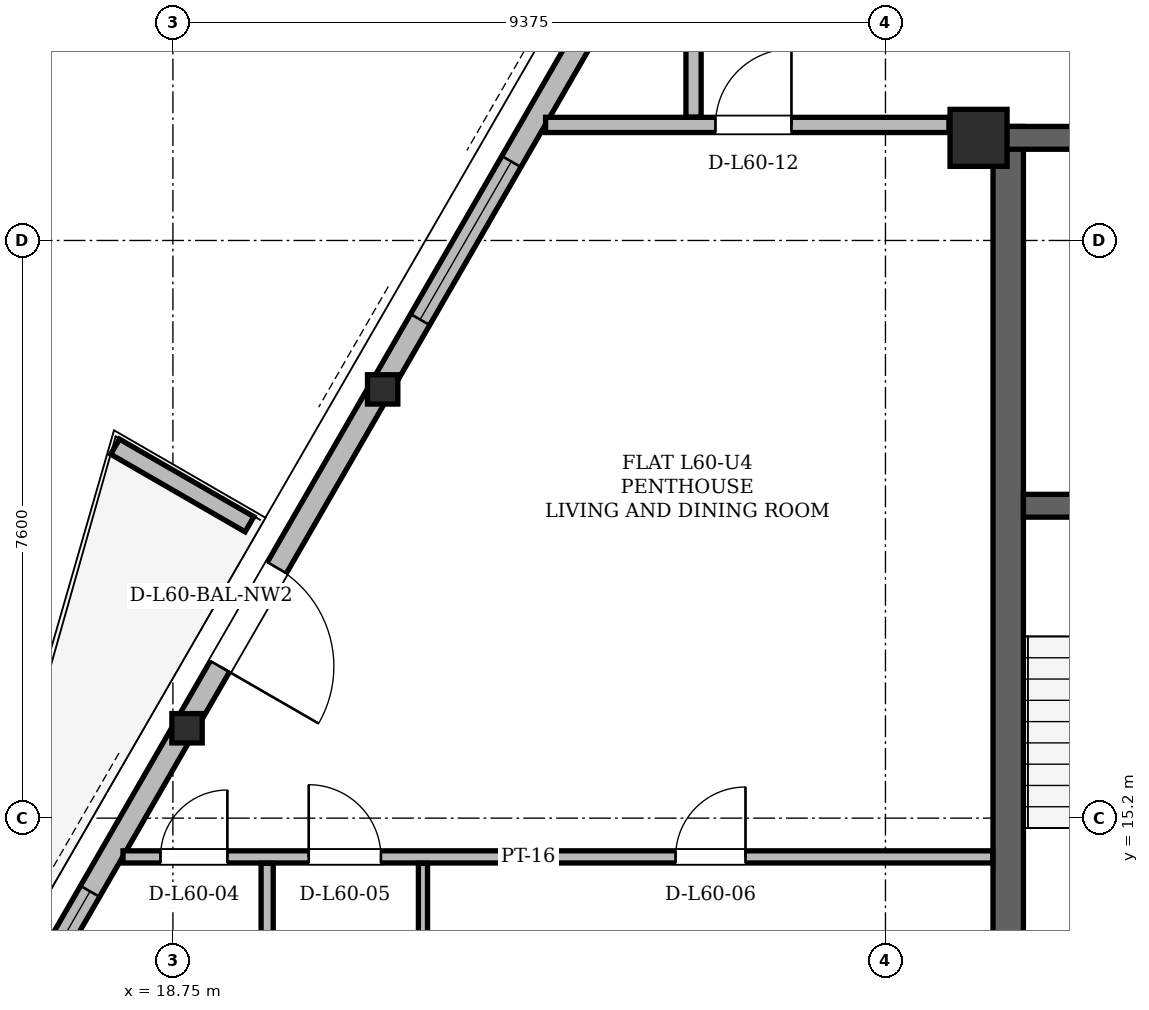
"""IFC4 building model, lengths in metres.
Left out: names, types, materials, properties, quantities, classifications, styles, units other than length and angle.
Written with IfcOpenShell. Run it as: python <this file> out.ifc"""

import sys

from ifc_helpers import new_model, si_unit, direction, frame, frame_2d, origin, origin_2d, place, context, subcontext, project, spatial, polyline, rectangle, hollow_rectangle, i_section, outline, extrude, element, fill, save


model = new_model("IFC4")
c1 = context("Model", 3, precision=1e-05, world=origin(), true_north=direction((0.0, 1.0)))
c2 = subcontext(c1, "Body", "Model", "MODEL_VIEW")
j1 = project(units=[si_unit("LENGTHUNIT", "METRE"), si_unit("PLANEANGLEUNIT", "RADIAN")], contexts=[c1])
p1 = place(None, origin())
s1 = spatial("IfcSite", under=j1, at=p1, CompositionType="ELEMENT")
p2 = place(p1, origin())
s2 = spatial("IfcBuilding", under=s1, at=p2, CompositionType="ELEMENT")
p3 = place(p2, frame((0.0, 0.0, 227.1)))
s3 = spatial("IfcBuildingStorey", under=s2, at=p3, CompositionType="ELEMENT", Elevation=227.1)
p4 = place(p3, frame((29.35, 24.15, 0.0), z_axis=(0.0, 0.0, 1.0), x_axis=(1.0, 0.0, 0.0)))
e1 = element("IfcColumn", 1, at=p4, inside=s3, PredefinedType="COLUMN", context=c2, shape_type="SweptSolid", body=[
    extrude(hollow_rectangle(XDim=0.75, YDim=0.75, WallThickness=0.06, at=origin_2d()), origin(), (0.0, 0.0, 1.0), 3.6),
])
p5 = place(p3, frame((21.484, 20.862, 0.004), z_axis=(0.014138633229, -0.011623587895, 0.999832481596), x_axis=(0.635056158455, 0.772465970518, 0.0)))
e2 = element("IfcColumn", 2, at=p5, inside=s3, PredefinedType="COLUMN", context=c2, shape_type="SweptSolid", body=[
    extrude(i_section(OverallWidth=0.399, OverallDepth=0.386, WebThickness=0.021, FlangeThickness=0.033, at=origin_2d()), origin(), (0.0, 0.0, 1.0), 3.592),
])
p6 = place(p3, frame((18.912, 16.407, 0.004), z_axis=(0.013118912573, -0.013390807134, 0.999824274769), x_axis=(0.714321588262, 0.699817596622, 0.0)))
e3 = element("IfcColumn", 3, at=p6, inside=s3, PredefinedType="COLUMN", context=c2, shape_type="SweptSolid", body=[
    extrude(i_section(OverallWidth=0.399, OverallDepth=0.386, WebThickness=0.021, FlangeThickness=0.033, at=origin_2d()), origin(), (0.0, 0.0, 1.0), 3.592),
])
p7 = place(p3, frame((29.74, 11.0, 0.0), z_axis=(0.0, 0.0, 1.0), x_axis=(0.0, 1.0, 0.0)))
e4 = element("IfcWall", 4, at=p7, inside=s3, PredefinedType="SHEAR", context=c2, shape_type="SweptSolid", body=[
    extrude(rectangle(XDim=13.3, YDim=0.4, at=frame_2d((6.65, 0.0))), origin(), (0.0, 0.0, 1.0), 3.38),
])
p8 = place(p3, frame((29.65, 24.15, 0.0), z_axis=(0.0, 0.0, 1.0), x_axis=(1.0, 0.0, 0.0)))
e5 = element("IfcWall", 5, at=p8, inside=s3, PredefinedType="SHEAR", context=c2, shape_type="SweptSolid", body=[
    extrude(rectangle(XDim=15.7, YDim=0.3, at=frame_2d((7.85, 0.0))), origin(), (0.0, 0.0, 1.0), 3.38),
])
p9 = place(p8, frame((1.7, 0.0, 0.0)))
e6 = element("IfcOpeningElement", 6, at=p9, cuts=e5, PredefinedType="OPENING", context=c2, shape_type="SweptSolid", body=[
    extrude(rectangle(XDim=1.2, YDim=2.2, at=frame_2d((0.6, 1.1))), frame((0.0, 0.15, 0.0), z_axis=(0.0, -1.0, 0.0), x_axis=(1.0, 0.0, 0.0)), (0.0, 0.0, 1.0), 0.3),
])
p10 = place(p8, frame((12.8, 0.0, 0.0)))
e7 = element("IfcOpeningElement", 7, at=p10, cuts=e5, PredefinedType="OPENING", context=c2, shape_type="SweptSolid", body=[
    extrude(rectangle(XDim=1.2, YDim=2.2, at=frame_2d((0.6, 1.1))), frame((0.0, 0.15, 0.0), z_axis=(0.0, -1.0, 0.0), x_axis=(1.0, 0.0, 0.0)), (0.0, 0.0, 1.0), 0.3),
])
p11 = place(p8, frame((6.55, 0.0, 0.0)))
e8 = element("IfcOpeningElement", 8, at=p11, cuts=e5, PredefinedType="OPENING", context=c2, shape_type="SweptSolid", body=[
    extrude(rectangle(XDim=0.9, YDim=2.05, at=frame_2d((0.45, 1.025))), frame((0.0, 0.15, 0.0), z_axis=(0.0, -1.0, 0.0), x_axis=(1.0, 0.0, 0.0)), (0.0, 0.0, 1.0), 0.3),
])
p12 = place(p8, frame((8.45, 0.0, 0.0)))
e9 = element("IfcOpeningElement", 9, at=p12, cuts=e5, PredefinedType="OPENING", context=c2, shape_type="SweptSolid", body=[
    extrude(rectangle(XDim=0.9, YDim=2.05, at=frame_2d((0.45, 1.025))), frame((0.0, 0.15, 0.0), z_axis=(0.0, -1.0, 0.0), x_axis=(1.0, 0.0, 0.0)), (0.0, 0.0, 1.0), 0.3),
])
p13 = place(p3, frame((29.94, 19.31, 0.0), z_axis=(0.0, 0.0, 1.0), x_axis=(1.0, 0.0, 0.0)))
e10 = element("IfcWall", 10, at=p13, inside=s3, PredefinedType="SHEAR", context=c2, shape_type="SweptSolid", body=[
    extrude(rectangle(XDim=4.01, YDim=0.3, at=frame_2d((2.005, 0.0))), origin(), (0.0, 0.0, 1.0), 3.38),
])
p14 = place(p13, frame((1.01, 0.0, 0.0)))
e11 = element("IfcOpeningElement", 11, at=p14, cuts=e10, PredefinedType="OPENING", context=c2, shape_type="SweptSolid", body=[
    extrude(rectangle(XDim=1.4, YDim=2.2, at=frame_2d((0.7, 1.1))), frame((0.0, 0.15, 0.0), z_axis=(0.0, -1.0, 0.0), x_axis=(1.0, 0.0, 0.0)), (0.0, 0.0, 1.0), 0.3),
])
p15 = place(p3, frame((34.344, 43.135, 0.0), z_axis=(0.0, 0.0, 1.0), x_axis=(-0.499998927115, -0.866026023214, 0.0)))
e12 = element("IfcWall", 12, at=p15, inside=s3, PredefinedType="SOLIDWALL", context=c2, shape_type="SweptSolid", body=[
    extrude(rectangle(XDim=36.742, YDim=0.29, at=frame_2d((18.371, 0.0))), origin(), (0.0, 0.0, 1.0), 2.677),
])
p16 = place(p15, frame((8.664, 0.0, 0.0)))
e13 = element("IfcOpeningElement", 13, at=p16, cuts=e12, PredefinedType="OPENING", context=c2, shape_type="SweptSolid", body=[
    extrude(rectangle(XDim=1.5, YDim=2.2, at=frame_2d((0.75, 1.1))), frame((0.0, 0.145, 0.0), z_axis=(0.0, -1.0, 0.0), x_axis=(1.0, 0.0, 0.0)), (0.0, 0.0, 1.0), 0.29),
])
p17 = place(p15, frame((28.452, 0.0, 0.0)))
e14 = element("IfcOpeningElement", 14, at=p17, cuts=e12, PredefinedType="OPENING", context=c2, shape_type="SweptSolid", body=[
    extrude(rectangle(XDim=1.5, YDim=2.2, at=frame_2d((0.75, 1.1))), frame((0.0, 0.145, 0.0), z_axis=(0.0, -1.0, 0.0), x_axis=(1.0, 0.0, 0.0)), (0.0, 0.0, 1.0), 0.29),
])
p18 = place(p15, frame((22.282, 0.0, 0.85)))
e15 = element("IfcOpeningElement", 15, at=p18, cuts=e12, PredefinedType="OPENING", context=c2, shape_type="SweptSolid", body=[
    extrude(rectangle(XDim=2.4, YDim=1.717, at=frame_2d((1.2, 0.858))), frame((0.0, 0.145, 0.0), z_axis=(0.0, -1.0, 0.0), x_axis=(1.0, 0.0, 0.0)), (0.0, 0.0, 1.0), 0.29),
])
p19 = place(p15, frame((33.369, 0.0, 0.85)))
e16 = element("IfcOpeningElement", 16, at=p19, cuts=e12, PredefinedType="OPENING", context=c2, shape_type="SweptSolid", body=[
    extrude(rectangle(XDim=2.2, YDim=1.717, at=frame_2d((1.1, 0.858))), frame((0.0, 0.145, 0.0), z_axis=(0.0, -1.0, 0.0), x_axis=(1.0, 0.0, 0.0)), (0.0, 0.0, 1.0), 0.29),
])
p20 = place(p15, frame((11.999, 0.0, 0.85)))
e17 = element("IfcOpeningElement", 17, at=p20, cuts=e12, PredefinedType="OPENING", context=c2, shape_type="SweptSolid", body=[
    extrude(rectangle(XDim=2.4, YDim=1.717, at=frame_2d((1.2, 0.858))), frame((0.0, 0.145, 0.0), z_axis=(0.0, -1.0, 0.0), x_axis=(1.0, 0.0, 0.0)), (0.0, 0.0, 1.0), 0.29),
])
p21 = place(p15, frame((16.783, 0.0, 0.85)))
e18 = element("IfcOpeningElement", 18, at=p21, cuts=e12, PredefinedType="OPENING", context=c2, shape_type="SweptSolid", body=[
    extrude(rectangle(XDim=1.8, YDim=1.717, at=frame_2d((0.9, 0.858))), frame((0.0, 0.145, 0.0), z_axis=(0.0, -1.0, 0.0), x_axis=(1.0, 0.0, 0.0)), (0.0, 0.0, 1.0), 0.29),
])
p22 = place(p15, frame((3.365, 0.0, 0.85)))
e19 = element("IfcOpeningElement", 19, at=p22, cuts=e12, PredefinedType="OPENING", context=c2, shape_type="SweptSolid", body=[
    extrude(rectangle(XDim=1.2, YDim=1.48, at=frame_2d((0.6, 0.74))), frame((0.0, 0.145, 0.0), z_axis=(0.0, -1.0, 0.0), x_axis=(1.0, 0.0, 0.0)), (0.0, 0.0, 1.0), 0.29),
])
p23 = place(p15, frame((6.797, 0.0, 0.85)))
e20 = element("IfcOpeningElement", 20, at=p23, cuts=e12, PredefinedType="OPENING", context=c2, shape_type="SweptSolid", body=[
    extrude(rectangle(XDim=1.2, YDim=1.48, at=frame_2d((0.6, 0.74))), frame((0.0, 0.145, 0.0), z_axis=(0.0, -1.0, 0.0), x_axis=(1.0, 0.0, 0.0)), (0.0, 0.0, 1.0), 0.29),
])
p24 = place(p3, frame((19.757, 19.066, 0.0), z_axis=(0.0, 0.0, 1.0), x_axis=(-0.866012356593, 0.500022597718, 0.0)))
e21 = element("IfcWall", 21, at=p24, inside=s3, PredefinedType="PARAPET", context=c2, shape_type="SweptSolid", body=[
    extrude(outline(polyline([(0.0, 0.0), (2.042, 0.0), (2.042, 1.1), (0.0, 1.32), (0.0, 0.0)])), frame((0.0, 0.115, 0.0), z_axis=(0.0, -1.0, 0.0), x_axis=(1.0, 0.0, 0.0)), (0.0, 0.0, 1.0), 0.23),
])
p25 = place(p3, frame((18.094, 14.69, 0.0), z_axis=(0.0, 0.0, 1.0), x_axis=(1.0, 0.0, 0.0)))
e22 = element("IfcWall", 22, at=p25, inside=s3, PredefinedType="PARTITIONING", context=c2, shape_type="SweptSolid", body=[
    extrude(rectangle(XDim=11.442, YDim=0.16, at=frame_2d((5.721, 0.0))), origin(), (0.0, 0.0, 1.0), 2.52),
])
p26 = place(p25, frame((0.493, 0.0, 0.0)))
e23 = element("IfcOpeningElement", 23, at=p26, cuts=e22, PredefinedType="OPENING", context=c2, shape_type="SweptSolid", body=[
    extrude(rectangle(XDim=0.88, YDim=2.08, at=frame_2d((0.44, 1.04))), frame((0.0, 0.08, 0.0), z_axis=(0.0, -1.0, 0.0), x_axis=(1.0, 0.0, 0.0)), (0.0, 0.0, 1.0), 0.16),
])
p27 = place(p25, frame((2.443, 0.0, 0.0)))
e24 = element("IfcOpeningElement", 24, at=p27, cuts=e22, PredefinedType="OPENING", context=c2, shape_type="SweptSolid", body=[
    extrude(rectangle(XDim=0.95, YDim=2.1, at=frame_2d((0.475, 1.05))), frame((0.0, 0.08, 0.0), z_axis=(0.0, -1.0, 0.0), x_axis=(1.0, 0.0, 0.0)), (0.0, 0.0, 1.0), 0.16),
])
p28 = place(p25, frame((7.27, 0.0, 0.0)))
e25 = element("IfcOpeningElement", 25, at=p28, cuts=e22, PredefinedType="OPENING", context=c2, shape_type="SweptSolid", body=[
    extrude(rectangle(XDim=0.92, YDim=2.12, at=frame_2d((0.46, 1.06))), frame((0.0, 0.08, 0.0), z_axis=(0.0, -1.0, 0.0), x_axis=(1.0, 0.0, 0.0)), (0.0, 0.0, 1.0), 0.16),
])
p29 = place(p3, frame((23.653, 24.32, 0.0), z_axis=(0.0, 0.0, 1.0), x_axis=(1.0, 0.0, 0.0)))
e26 = element("IfcWall", 26, at=p29, inside=s3, PredefinedType="PARTITIONING", context=c2, shape_type="SweptSolid", body=[
    extrude(rectangle(XDim=5.307, YDim=0.2, at=frame_2d((2.653, 0.0))), origin(), (0.0, 0.0, 1.0), 3.38),
])
p30 = place(p29, frame((2.235, 0.0, 0.0)))
e27 = element("IfcOpeningElement", 27, at=p30, cuts=e26, PredefinedType="OPENING", context=c2, shape_type="SweptSolid", body=[
    extrude(rectangle(XDim=1.0, YDim=2.18, at=frame_2d((0.5, 1.09))), frame((0.0, 0.1, 0.0), z_axis=(0.0, -1.0, 0.0), x_axis=(1.0, 0.0, 0.0)), (0.0, 0.0, 1.0), 0.2),
])
p31 = place(p3, frame((19.99, 11.054, 0.0), z_axis=(0.0, 0.0, 1.0), x_axis=(0.0, 1.0, 0.0)))
e28 = element("IfcWall", 28, at=p31, inside=s3, PredefinedType="PARTITIONING", context=c2, shape_type="SweptSolid", body=[
    extrude(rectangle(XDim=3.552, YDim=0.16, at=frame_2d((1.776, 0.0))), origin(), (0.0, 0.0, 1.0), 2.913),
])
p32 = place(p3, frame((22.04, 11.054, 0.0), z_axis=(0.0, 0.0, 1.0), x_axis=(0.0, 1.0, 0.0)))
e29 = element("IfcWall", 29, at=p32, inside=s3, PredefinedType="PARTITIONING", context=c2, shape_type="SweptSolid", body=[
    extrude(rectangle(XDim=3.552, YDim=0.12, at=frame_2d((1.776, 0.0))), origin(), (0.0, 0.0, 1.0), 3.38),
])
p33 = place(p3, frame((25.6, 24.424, 0.0), z_axis=(0.0, 0.0, 1.0), x_axis=(0.0, 1.0, 0.0)))
e30 = element("IfcWall", 30, at=p33, inside=s3, PredefinedType="PARTITIONING", context=c2, shape_type="SweptSolid", body=[
    extrude(rectangle(XDim=1.442, YDim=0.2, at=frame_2d((0.721, 0.0))), origin(), (0.0, 0.0, 1.0), 3.38),
])
p34 = place(p17, origin())
e31 = element("IfcDoor", 31, at=p34, inside=s3, OperationType="SINGLE_SWING_RIGHT", PredefinedType="DOOR", context=c2, shape_type="SweptSolid", body=[
    extrude(rectangle(XDim=1.5, YDim=2.2, at=frame_2d((0.75, 1.1))), frame((0.0, 0.025, 0.0), z_axis=(0.0, -1.0, 0.0), x_axis=(1.0, 0.0, 0.0)), (0.0, 0.0, 1.0), 0.05),
])
fill(e14, e31)
p35 = place(p18, origin())
e32 = element("IfcWindow", 32, at=p35, inside=s3, PartitioningType="SINGLE_PANEL", PredefinedType="WINDOW", context=c2, shape_type="SweptSolid", body=[
    extrude(rectangle(XDim=2.4, YDim=1.717, at=frame_2d((1.2, 0.858))), frame((0.0, 0.03, 0.0), z_axis=(0.0, -1.0, 0.0), x_axis=(1.0, 0.0, 0.0)), (0.0, 0.0, 1.0), 0.06),
])
fill(e15, e32)
p36 = place(p19, origin())
e33 = element("IfcWindow", 33, at=p36, inside=s3, PartitioningType="SINGLE_PANEL", PredefinedType="WINDOW", context=c2, shape_type="SweptSolid", body=[
    extrude(rectangle(XDim=2.2, YDim=1.717, at=frame_2d((1.1, 0.858))), frame((0.0, 0.03, 0.0), z_axis=(0.0, -1.0, 0.0), x_axis=(1.0, 0.0, 0.0)), (0.0, 0.0, 1.0), 0.06),
])
fill(e16, e33)
p37 = place(p26, origin())
e34 = element("IfcDoor", 34, at=p37, inside=s3, OperationType="SINGLE_SWING_RIGHT", PredefinedType="DOOR", context=c2, shape_type="SweptSolid", body=[
    extrude(rectangle(XDim=0.88, YDim=2.08, at=frame_2d((0.44, 1.04))), frame((0.0, 0.025, 0.0), z_axis=(0.0, -1.0, 0.0), x_axis=(1.0, 0.0, 0.0)), (0.0, 0.0, 1.0), 0.05),
])
fill(e23, e34)
p38 = place(p27, origin())
e35 = element("IfcDoor", 35, at=p38, inside=s3, OperationType="SINGLE_SWING_LEFT", PredefinedType="DOOR", context=c2, shape_type="SweptSolid", body=[
    extrude(rectangle(XDim=0.95, YDim=2.1, at=frame_2d((0.475, 1.05))), frame((0.0, 0.025, 0.0), z_axis=(0.0, -1.0, 0.0), x_axis=(1.0, 0.0, 0.0)), (0.0, 0.0, 1.0), 0.05),
])
fill(e24, e35)
p39 = place(p28, origin())
e36 = element("IfcDoor", 36, at=p39, inside=s3, OperationType="SINGLE_SWING_RIGHT", PredefinedType="DOOR", context=c2, shape_type="SweptSolid", body=[
    extrude(rectangle(XDim=0.92, YDim=2.12, at=frame_2d((0.46, 1.06))), frame((0.0, 0.025, 0.0), z_axis=(0.0, -1.0, 0.0), x_axis=(1.0, 0.0, 0.0)), (0.0, 0.0, 1.0), 0.05),
])
fill(e25, e36)
p40 = place(p30, origin())
e37 = element("IfcDoor", 37, at=p40, inside=s3, OperationType="SINGLE_SWING_RIGHT", PredefinedType="DOOR", context=c2, shape_type="SweptSolid", body=[
    extrude(rectangle(XDim=1.0, YDim=2.18, at=frame_2d((0.5, 1.09))), frame((0.0, 0.025, 0.0), z_axis=(0.0, -1.0, 0.0), x_axis=(1.0, 0.0, 0.0)), (0.0, 0.0, 1.0), 0.05),
])
fill(e27, e37)
save(model, sys.argv[1])
